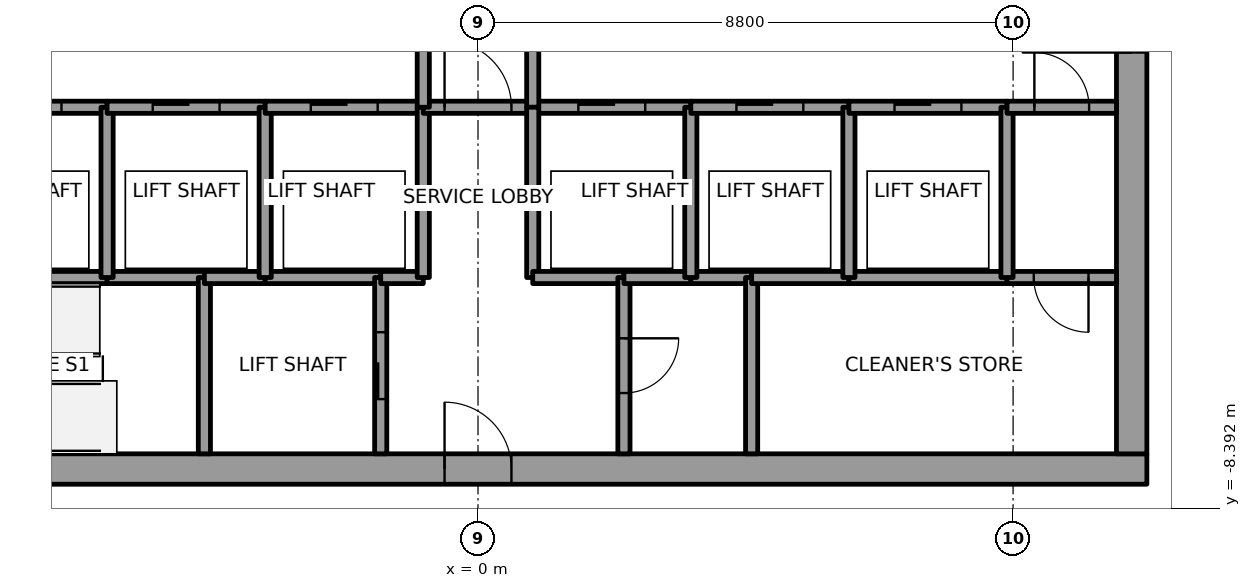
"""IFC4 building model, lengths in metres.
Left out: names, types, materials, properties, quantities, classifications, styles, units other than length and angle.
Written with IfcOpenShell. Run it as: python <this file> out.ifc"""

import sys

from ifc_helpers import new_model, si_unit, direction, frame, frame_2d, origin, place, context, subcontext, project, spatial, rectangle, extrude, element, fill, save


model = new_model("IFC4")
c1 = context("Model", 3, precision=1e-05, world=origin(), true_north=direction((0.0, 1.0)))
c2 = subcontext(c1, "Body", "Model", "MODEL_VIEW")
j1 = project(units=[si_unit("LENGTHUNIT", "METRE"), si_unit("PLANEANGLEUNIT", "RADIAN")], contexts=[c1])
p1 = place(None, origin())
s1 = spatial("IfcSite", under=j1, at=p1, CompositionType="ELEMENT")
p2 = place(p1, origin())
s2 = spatial("IfcBuilding", under=s1, at=p2, CompositionType="ELEMENT")
p3 = place(p2, frame((0.0, 0.0, 247.0)))
s3 = spatial("IfcBuildingStorey", under=s2, at=p3, CompositionType="ELEMENT", Elevation=247.0)
p4 = place(p3, frame((-11.0, -7.75, 0.0), z_axis=(0.0, 0.0, 1.0), x_axis=(1.0, 0.0, 0.0)))
e1 = element("IfcWall", 1, at=p4, inside=s3, PredefinedType="SHEAR", context=c2, shape_type="SweptSolid", body=[
    extrude(rectangle(XDim=22.0, YDim=0.5, at=frame_2d((11.0, 0.0))), origin(), (0.0, 0.0, 1.0), 4.0),
])
p5 = place(p4, frame((10.45, 0.0, 0.0)))
e2 = element("IfcOpeningElement", 2, at=p5, cuts=e1, PredefinedType="OPENING", context=c2, shape_type="SweptSolid", body=[
    extrude(rectangle(XDim=1.1, YDim=2.1, at=frame_2d((0.55, 1.05))), frame((0.0, 0.25, 0.0), z_axis=(0.0, -1.0, 0.0), x_axis=(1.0, 0.0, 0.0)), (0.0, 0.0, 1.0), 0.5),
])
p6 = place(p3, frame((10.75, -7.5, 0.0), z_axis=(0.0, 0.0, 1.0), x_axis=(0.0, 1.0, 0.0)))
e3 = element("IfcWall", 3, at=p6, inside=s3, PredefinedType="SHEAR", context=c2, shape_type="SweptSolid", body=[
    extrude(rectangle(XDim=15.0, YDim=0.5, at=frame_2d((7.5, 0.0))), origin(), (0.0, 0.0, 1.0), 4.0),
])
p7 = place(p6, frame((6.6, 0.0, 0.0)))
e4 = element("IfcOpeningElement", 4, at=p7, cuts=e3, PredefinedType="OPENING", context=c2, shape_type="SweptSolid", body=[
    extrude(rectangle(XDim=1.8, YDim=2.1, at=frame_2d((0.9, 1.05))), frame((0.0, 0.25, 0.0), z_axis=(0.0, -1.0, 0.0), x_axis=(1.0, 0.0, 0.0)), (0.0, 0.0, 1.0), 0.5),
])
p8 = place(p3, frame((-8.7, -4.6, 0.0), z_axis=(0.0, 0.0, 1.0), x_axis=(1.0, 0.0, 0.0)))
e5 = element("IfcWall", 5, at=p8, inside=s3, PredefinedType="SOLIDWALL", context=c2, shape_type="SweptSolid", body=[
    extrude(rectangle(XDim=2.6, YDim=0.2, at=frame_2d((1.3, 0.0))), origin(), (0.0, 0.0, 1.0), 3.85),
])
p9 = place(p3, frame((-8.7, -1.8, 0.0), z_axis=(0.0, 0.0, 1.0), x_axis=(1.0, 0.0, 0.0)))
e6 = element("IfcWall", 6, at=p9, inside=s3, PredefinedType="SOLIDWALL", context=c2, shape_type="SweptSolid", body=[
    extrude(rectangle(XDim=2.6, YDim=0.2, at=frame_2d((1.3, 0.0))), origin(), (0.0, 0.0, 1.0), 3.85),
])
p10 = place(p9, frame((0.75, 0.0, 0.0)))
e7 = element("IfcOpeningElement", 7, at=p10, cuts=e6, PredefinedType="OPENING", context=c2, shape_type="SweptSolid", body=[
    extrude(rectangle(XDim=1.1, YDim=2.1, at=frame_2d((0.55, 1.05))), frame((0.0, 0.1, 0.0), z_axis=(0.0, -1.0, 0.0), x_axis=(1.0, 0.0, 0.0)), (0.0, 0.0, 1.0), 0.2),
])
p11 = place(p3, frame((-6.1, -4.6, 0.0), z_axis=(0.0, 0.0, 1.0), x_axis=(1.0, 0.0, 0.0)))
e8 = element("IfcWall", 8, at=p11, inside=s3, PredefinedType="SOLIDWALL", context=c2, shape_type="SweptSolid", body=[
    extrude(rectangle(XDim=1.6, YDim=0.2, at=frame_2d((0.8, 0.0))), origin(), (0.0, 0.0, 1.0), 3.85),
])
p12 = place(p3, frame((-6.1, -4.6, 0.0), z_axis=(0.0, 0.0, 1.0), x_axis=(0.0, 1.0, 0.0)))
e9 = element("IfcWall", 9, at=p12, inside=s3, PredefinedType="SOLIDWALL", context=c2, shape_type="SweptSolid", body=[
    extrude(rectangle(XDim=2.8, YDim=0.2, at=frame_2d((1.4, 0.0))), origin(), (0.0, 0.0, 1.0), 3.85),
])
p13 = place(p3, frame((-6.1, -1.8, 0.0), z_axis=(0.0, 0.0, 1.0), x_axis=(1.0, 0.0, 0.0)))
e10 = element("IfcWall", 10, at=p13, inside=s3, PredefinedType="SOLIDWALL", context=c2, shape_type="SweptSolid", body=[
    extrude(rectangle(XDim=2.6, YDim=0.2, at=frame_2d((1.3, 0.0))), origin(), (0.0, 0.0, 1.0), 3.85),
])
p14 = place(p13, frame((0.75, 0.0, 0.0)))
e11 = element("IfcOpeningElement", 11, at=p14, cuts=e10, PredefinedType="OPENING", context=c2, shape_type="SweptSolid", body=[
    extrude(rectangle(XDim=1.1, YDim=2.1, at=frame_2d((0.55, 1.05))), frame((0.0, 0.1, 0.0), z_axis=(0.0, -1.0, 0.0), x_axis=(1.0, 0.0, 0.0)), (0.0, 0.0, 1.0), 0.2),
])
p15 = place(p3, frame((-4.5, -4.6, 0.0), z_axis=(0.0, 0.0, 1.0), x_axis=(0.0, -1.0, 0.0)))
e12 = element("IfcWall", 12, at=p15, inside=s3, PredefinedType="SOLIDWALL", context=c2, shape_type="SweptSolid", body=[
    extrude(rectangle(XDim=2.9, YDim=0.2, at=frame_2d((1.45, 0.0))), origin(), (0.0, 0.0, 1.0), 3.85),
])
p16 = place(p3, frame((-4.5, -4.6, 0.0), z_axis=(0.0, 0.0, 1.0), x_axis=(1.0, 0.0, 0.0)))
e13 = element("IfcWall", 13, at=p16, inside=s3, PredefinedType="SOLIDWALL", context=c2, shape_type="SweptSolid", body=[
    extrude(rectangle(XDim=1.0, YDim=0.2, at=frame_2d((0.5, 0.0))), origin(), (0.0, 0.0, 1.0), 3.85),
])
p17 = place(p3, frame((-3.5, -4.6, 0.0), z_axis=(0.0, 0.0, 1.0), x_axis=(1.0, 0.0, 0.0)))
e14 = element("IfcWall", 14, at=p17, inside=s3, PredefinedType="SOLIDWALL", context=c2, shape_type="SweptSolid", body=[
    extrude(rectangle(XDim=1.9, YDim=0.2, at=frame_2d((0.95, 0.0))), origin(), (0.0, 0.0, 1.0), 3.85),
])
p18 = place(p3, frame((-3.5, -4.6, 0.0), z_axis=(0.0, 0.0, 1.0), x_axis=(0.0, 1.0, 0.0)))
e15 = element("IfcWall", 15, at=p18, inside=s3, PredefinedType="SOLIDWALL", context=c2, shape_type="SweptSolid", body=[
    extrude(rectangle(XDim=2.8, YDim=0.2, at=frame_2d((1.4, 0.0))), origin(), (0.0, 0.0, 1.0), 3.85),
])
p19 = place(p3, frame((-3.5, -1.8, 0.0), z_axis=(0.0, 0.0, 1.0), x_axis=(1.0, 0.0, 0.0)))
e16 = element("IfcWall", 16, at=p19, inside=s3, PredefinedType="SOLIDWALL", context=c2, shape_type="SweptSolid", body=[
    extrude(rectangle(XDim=2.6, YDim=0.2, at=frame_2d((1.3, 0.0))), origin(), (0.0, 0.0, 1.0), 3.85),
])
p20 = place(p19, frame((0.75, 0.0, 0.0)))
e17 = element("IfcOpeningElement", 17, at=p20, cuts=e16, PredefinedType="OPENING", context=c2, shape_type="SweptSolid", body=[
    extrude(rectangle(XDim=1.1, YDim=2.1, at=frame_2d((0.55, 1.05))), frame((0.0, 0.1, 0.0), z_axis=(0.0, -1.0, 0.0), x_axis=(1.0, 0.0, 0.0)), (0.0, 0.0, 1.0), 0.2),
])
p21 = place(p3, frame((-1.6, -7.5, 0.0), z_axis=(0.0, 0.0, 1.0), x_axis=(0.0, 1.0, 0.0)))
e18 = element("IfcWall", 18, at=p21, inside=s3, PredefinedType="SOLIDWALL", context=c2, shape_type="SweptSolid", body=[
    extrude(rectangle(XDim=2.9, YDim=0.2, at=frame_2d((1.45, 0.0))), origin(), (0.0, 0.0, 1.0), 3.85),
])
p22 = place(p21, frame((0.9, 0.0, 0.0)))
e19 = element("IfcOpeningElement", 19, at=p22, cuts=e18, PredefinedType="OPENING", context=c2, shape_type="SweptSolid", body=[
    extrude(rectangle(XDim=1.1, YDim=2.1, at=frame_2d((0.55, 1.05))), frame((0.0, 0.1, 0.0), z_axis=(0.0, -1.0, 0.0), x_axis=(1.0, 0.0, 0.0)), (0.0, 0.0, 1.0), 0.2),
])
p23 = place(p3, frame((-1.6, -4.6, 0.0), z_axis=(0.0, 0.0, 1.0), x_axis=(1.0, 0.0, 0.0)))
e20 = element("IfcWall", 20, at=p23, inside=s3, PredefinedType="SOLIDWALL", context=c2, shape_type="SweptSolid", body=[
    extrude(rectangle(XDim=0.7, YDim=0.2, at=frame_2d((0.35, 0.0))), origin(), (0.0, 0.0, 1.0), 3.85),
])
p24 = place(p3, frame((-0.9, -4.6, 0.0), z_axis=(0.0, 0.0, 1.0), x_axis=(0.0, 1.0, 0.0)))
e21 = element("IfcWall", 21, at=p24, inside=s3, PredefinedType="SOLIDWALL", context=c2, shape_type="SweptSolid", body=[
    extrude(rectangle(XDim=2.8, YDim=0.2, at=frame_2d((1.4, 0.0))), origin(), (0.0, 0.0, 1.0), 3.85),
])
p25 = place(p3, frame((-0.9, -1.8, 0.0), z_axis=(0.0, 0.0, 1.0), x_axis=(1.0, 0.0, 0.0)))
e22 = element("IfcWall", 22, at=p25, inside=s3, PredefinedType="SOLIDWALL", context=c2, shape_type="SweptSolid", body=[
    extrude(rectangle(XDim=1.8, YDim=0.2, at=frame_2d((0.9, 0.0))), origin(), (0.0, 0.0, 1.0), 3.85),
])
p26 = place(p25, frame((0.35, 0.0, 0.0)))
e23 = element("IfcOpeningElement", 23, at=p26, cuts=e22, PredefinedType="OPENING", context=c2, shape_type="SweptSolid", body=[
    extrude(rectangle(XDim=1.1, YDim=2.1, at=frame_2d((0.55, 1.05))), frame((0.0, 0.1, 0.0), z_axis=(0.0, -1.0, 0.0), x_axis=(1.0, 0.0, 0.0)), (0.0, 0.0, 1.0), 0.2),
])
p27 = place(p3, frame((-0.9, 1.8, 0.0), z_axis=(0.0, 0.0, 1.0), x_axis=(0.0, -1.0, 0.0)))
e24 = element("IfcWall", 24, at=p27, inside=s3, PredefinedType="SOLIDWALL", context=c2, shape_type="SweptSolid", body=[
    extrude(rectangle(XDim=3.6, YDim=0.2, at=frame_2d((1.8, 0.0))), origin(), (0.0, 0.0, 1.0), 3.85),
])
p28 = place(p27, frame((1.05, 0.0, 0.0)))
e25 = element("IfcOpeningElement", 25, at=p28, cuts=e24, PredefinedType="OPENING", context=c2, shape_type="SweptSolid", body=[
    extrude(rectangle(XDim=1.5, YDim=2.1, at=frame_2d((0.75, 1.05))), frame((0.0, 0.1, 0.0), z_axis=(0.0, -1.0, 0.0), x_axis=(1.0, 0.0, 0.0)), (0.0, 0.0, 1.0), 0.2),
])
p29 = place(p3, frame((0.9, -1.8, 0.0), z_axis=(0.0, 0.0, 1.0), x_axis=(1.0, 0.0, 0.0)))
e26 = element("IfcWall", 26, at=p29, inside=s3, PredefinedType="SOLIDWALL", context=c2, shape_type="SweptSolid", body=[
    extrude(rectangle(XDim=2.6, YDim=0.2, at=frame_2d((1.3, 0.0))), origin(), (0.0, 0.0, 1.0), 3.85),
])
p30 = place(p29, frame((0.75, 0.0, 0.0)))
e27 = element("IfcOpeningElement", 27, at=p30, cuts=e26, PredefinedType="OPENING", context=c2, shape_type="SweptSolid", body=[
    extrude(rectangle(XDim=1.1, YDim=2.1, at=frame_2d((0.55, 1.05))), frame((0.0, 0.1, 0.0), z_axis=(0.0, -1.0, 0.0), x_axis=(1.0, 0.0, 0.0)), (0.0, 0.0, 1.0), 0.2),
])
p31 = place(p3, frame((0.9, -1.8, 0.0), z_axis=(0.0, 0.0, 1.0), x_axis=(0.0, 1.0, 0.0)))
e28 = element("IfcWall", 28, at=p31, inside=s3, PredefinedType="SOLIDWALL", context=c2, shape_type="SweptSolid", body=[
    extrude(rectangle(XDim=3.6, YDim=0.2, at=frame_2d((1.8, 0.0))), origin(), (0.0, 0.0, 1.0), 3.85),
])
p32 = place(p31, frame((1.05, 0.0, 0.0)))
e29 = element("IfcOpeningElement", 29, at=p32, cuts=e28, PredefinedType="OPENING", context=c2, shape_type="SweptSolid", body=[
    extrude(rectangle(XDim=1.5, YDim=2.1, at=frame_2d((0.75, 1.05))), frame((0.0, 0.1, 0.0), z_axis=(0.0, -1.0, 0.0), x_axis=(1.0, 0.0, 0.0)), (0.0, 0.0, 1.0), 0.2),
])
p33 = place(p3, frame((0.9, -1.8, 0.0), z_axis=(0.0, 0.0, 1.0), x_axis=(0.0, -1.0, 0.0)))
e30 = element("IfcWall", 30, at=p33, inside=s3, PredefinedType="SOLIDWALL", context=c2, shape_type="SweptSolid", body=[
    extrude(rectangle(XDim=2.8, YDim=0.2, at=frame_2d((1.4, 0.0))), origin(), (0.0, 0.0, 1.0), 3.85),
])
p34 = place(p3, frame((0.9, -4.6, 0.0), z_axis=(0.0, 0.0, 1.0), x_axis=(1.0, 0.0, 0.0)))
e31 = element("IfcWall", 31, at=p34, inside=s3, PredefinedType="SOLIDWALL", context=c2, shape_type="SweptSolid", body=[
    extrude(rectangle(XDim=1.5, YDim=0.2, at=frame_2d((0.75, 0.0))), origin(), (0.0, 0.0, 1.0), 3.85),
])
p35 = place(p3, frame((2.4, -4.6, 0.0), z_axis=(0.0, 0.0, 1.0), x_axis=(0.0, -1.0, 0.0)))
e32 = element("IfcWall", 32, at=p35, inside=s3, PredefinedType="SOLIDWALL", context=c2, shape_type="SweptSolid", body=[
    extrude(rectangle(XDim=2.9, YDim=0.2, at=frame_2d((1.45, 0.0))), origin(), (0.0, 0.0, 1.0), 3.85),
])
p36 = place(p35, frame((1.0, 0.0, 0.0)))
e33 = element("IfcOpeningElement", 33, at=p36, cuts=e32, PredefinedType="OPENING", context=c2, shape_type="SweptSolid", body=[
    extrude(rectangle(XDim=0.9, YDim=2.1, at=frame_2d((0.45, 1.05))), frame((0.0, 0.1, 0.0), z_axis=(0.0, -1.0, 0.0), x_axis=(1.0, 0.0, 0.0)), (0.0, 0.0, 1.0), 0.2),
])
p37 = place(p3, frame((3.5, -4.6, 0.0), z_axis=(0.0, 0.0, 1.0), x_axis=(-1.0, 0.0, 0.0)))
e34 = element("IfcWall", 34, at=p37, inside=s3, PredefinedType="SOLIDWALL", context=c2, shape_type="SweptSolid", body=[
    extrude(rectangle(XDim=1.1, YDim=0.2, at=frame_2d((0.55, 0.0))), origin(), (0.0, 0.0, 1.0), 3.85),
])
p38 = place(p3, frame((4.5, -4.6, 0.0), z_axis=(0.0, 0.0, 1.0), x_axis=(-1.0, 0.0, 0.0)))
e35 = element("IfcWall", 35, at=p38, inside=s3, PredefinedType="SOLIDWALL", context=c2, shape_type="SweptSolid", body=[
    extrude(rectangle(XDim=1.0, YDim=0.2, at=frame_2d((0.5, 0.0))), origin(), (0.0, 0.0, 1.0), 3.85),
])
p39 = place(p3, frame((3.5, -4.6, 0.0), z_axis=(0.0, 0.0, 1.0), x_axis=(0.0, 1.0, 0.0)))
e36 = element("IfcWall", 36, at=p39, inside=s3, PredefinedType="SOLIDWALL", context=c2, shape_type="SweptSolid", body=[
    extrude(rectangle(XDim=2.8, YDim=0.2, at=frame_2d((1.4, 0.0))), origin(), (0.0, 0.0, 1.0), 3.85),
])
p40 = place(p3, frame((3.5, -1.8, 0.0), z_axis=(0.0, 0.0, 1.0), x_axis=(1.0, 0.0, 0.0)))
e37 = element("IfcWall", 37, at=p40, inside=s3, PredefinedType="SOLIDWALL", context=c2, shape_type="SweptSolid", body=[
    extrude(rectangle(XDim=2.6, YDim=0.2, at=frame_2d((1.3, 0.0))), origin(), (0.0, 0.0, 1.0), 3.85),
])
p41 = place(p40, frame((0.75, 0.0, 0.0)))
e38 = element("IfcOpeningElement", 38, at=p41, cuts=e37, PredefinedType="OPENING", context=c2, shape_type="SweptSolid", body=[
    extrude(rectangle(XDim=1.1, YDim=2.1, at=frame_2d((0.55, 1.05))), frame((0.0, 0.1, 0.0), z_axis=(0.0, -1.0, 0.0), x_axis=(1.0, 0.0, 0.0)), (0.0, 0.0, 1.0), 0.2),
])
p42 = place(p3, frame((4.5, -4.6, 0.0), z_axis=(0.0, 0.0, 1.0), x_axis=(0.0, -1.0, 0.0)))
e39 = element("IfcWall", 39, at=p42, inside=s3, PredefinedType="SOLIDWALL", context=c2, shape_type="SweptSolid", body=[
    extrude(rectangle(XDim=2.9, YDim=0.2, at=frame_2d((1.45, 0.0))), origin(), (0.0, 0.0, 1.0), 3.85),
])
p43 = place(p3, frame((6.1, -4.6, 0.0), z_axis=(0.0, 0.0, 1.0), x_axis=(-1.0, 0.0, 0.0)))
e40 = element("IfcWall", 40, at=p43, inside=s3, PredefinedType="SOLIDWALL", context=c2, shape_type="SweptSolid", body=[
    extrude(rectangle(XDim=1.6, YDim=0.2, at=frame_2d((0.8, 0.0))), origin(), (0.0, 0.0, 1.0), 3.85),
])
p44 = place(p3, frame((8.7, -4.6, 0.0), z_axis=(0.0, 0.0, 1.0), x_axis=(-1.0, 0.0, 0.0)))
e41 = element("IfcWall", 41, at=p44, inside=s3, PredefinedType="SOLIDWALL", context=c2, shape_type="SweptSolid", body=[
    extrude(rectangle(XDim=2.6, YDim=0.2, at=frame_2d((1.3, 0.0))), origin(), (0.0, 0.0, 1.0), 3.85),
])
p45 = place(p3, frame((6.1, -4.6, 0.0), z_axis=(0.0, 0.0, 1.0), x_axis=(0.0, 1.0, 0.0)))
e42 = element("IfcWall", 42, at=p45, inside=s3, PredefinedType="SOLIDWALL", context=c2, shape_type="SweptSolid", body=[
    extrude(rectangle(XDim=2.8, YDim=0.2, at=frame_2d((1.4, 0.0))), origin(), (0.0, 0.0, 1.0), 3.85),
])
p46 = place(p3, frame((6.1, -1.8, 0.0), z_axis=(0.0, 0.0, 1.0), x_axis=(1.0, 0.0, 0.0)))
e43 = element("IfcWall", 43, at=p46, inside=s3, PredefinedType="SOLIDWALL", context=c2, shape_type="SweptSolid", body=[
    extrude(rectangle(XDim=2.6, YDim=0.2, at=frame_2d((1.3, 0.0))), origin(), (0.0, 0.0, 1.0), 3.85),
])
p47 = place(p46, frame((0.75, 0.0, 0.0)))
e44 = element("IfcOpeningElement", 44, at=p47, cuts=e43, PredefinedType="OPENING", context=c2, shape_type="SweptSolid", body=[
    extrude(rectangle(XDim=1.1, YDim=2.1, at=frame_2d((0.55, 1.05))), frame((0.0, 0.1, 0.0), z_axis=(0.0, -1.0, 0.0), x_axis=(1.0, 0.0, 0.0)), (0.0, 0.0, 1.0), 0.2),
])
p48 = place(p3, frame((10.5, -4.6, 0.0), z_axis=(0.0, 0.0, 1.0), x_axis=(-1.0, 0.0, 0.0)))
e45 = element("IfcWall", 45, at=p48, inside=s3, PredefinedType="SOLIDWALL", context=c2, shape_type="SweptSolid", body=[
    extrude(rectangle(XDim=1.8, YDim=0.2, at=frame_2d((0.9, 0.0))), origin(), (0.0, 0.0, 1.0), 3.85),
])
p49 = place(p48, frame((0.46, 0.0, 0.0)))
e46 = element("IfcOpeningElement", 46, at=p49, cuts=e45, PredefinedType="OPENING", context=c2, shape_type="SweptSolid", body=[
    extrude(rectangle(XDim=0.9, YDim=2.1, at=frame_2d((0.45, 1.05))), frame((0.0, 0.1, 0.0), z_axis=(0.0, -1.0, 0.0), x_axis=(1.0, 0.0, 0.0)), (0.0, 0.0, 1.0), 0.2),
])
p50 = place(p3, frame((8.7, -1.8, 0.0), z_axis=(0.0, 0.0, 1.0), x_axis=(0.0, -1.0, 0.0)))
e47 = element("IfcWall", 47, at=p50, inside=s3, PredefinedType="SOLIDWALL", context=c2, shape_type="SweptSolid", body=[
    extrude(rectangle(XDim=2.8, YDim=0.2, at=frame_2d((1.4, 0.0))), origin(), (0.0, 0.0, 1.0), 3.85),
])
p51 = place(p3, frame((8.7, -1.8, 0.0), z_axis=(0.0, 0.0, 1.0), x_axis=(1.0, 0.0, 0.0)))
e48 = element("IfcWall", 48, at=p51, inside=s3, PredefinedType="SOLIDWALL", context=c2, shape_type="SweptSolid", body=[
    extrude(rectangle(XDim=1.8, YDim=0.2, at=frame_2d((0.9, 0.0))), origin(), (0.0, 0.0, 1.0), 3.85),
])
p52 = place(p51, frame((0.45, 0.0, 0.0)))
e49 = element("IfcOpeningElement", 49, at=p52, cuts=e48, PredefinedType="OPENING", context=c2, shape_type="SweptSolid", body=[
    extrude(rectangle(XDim=0.9, YDim=2.1, at=frame_2d((0.45, 1.05))), frame((0.0, 0.1, 0.0), z_axis=(0.0, -1.0, 0.0), x_axis=(1.0, 0.0, 0.0)), (0.0, 0.0, 1.0), 0.2),
])
p53 = place(p10, origin())
e50 = element("IfcDoor", 50, at=p53, inside=s3, OperationType="SLIDING_TO_RIGHT", PredefinedType="DOOR", context=c2, shape_type="SweptSolid", body=[
    extrude(rectangle(XDim=1.1, YDim=2.1, at=frame_2d((0.55, 1.05))), frame((0.0, 0.025, 0.0), z_axis=(0.0, -1.0, 0.0), x_axis=(1.0, 0.0, 0.0)), (0.0, 0.0, 1.0), 0.05),
])
fill(e7, e50)
p54 = place(p14, origin())
e51 = element("IfcDoor", 51, at=p54, inside=s3, OperationType="SLIDING_TO_LEFT", PredefinedType="DOOR", context=c2, shape_type="SweptSolid", body=[
    extrude(rectangle(XDim=1.1, YDim=2.1, at=frame_2d((0.55, 1.05))), frame((0.0, 0.025, 0.0), z_axis=(0.0, -1.0, 0.0), x_axis=(1.0, 0.0, 0.0)), (0.0, 0.0, 1.0), 0.05),
])
fill(e11, e51)
p55 = place(p20, origin())
e52 = element("IfcDoor", 52, at=p55, inside=s3, OperationType="SLIDING_TO_LEFT", PredefinedType="DOOR", context=c2, shape_type="SweptSolid", body=[
    extrude(rectangle(XDim=1.1, YDim=2.1, at=frame_2d((0.55, 1.05))), frame((0.0, 0.025, 0.0), z_axis=(0.0, -1.0, 0.0), x_axis=(1.0, 0.0, 0.0)), (0.0, 0.0, 1.0), 0.05),
])
fill(e17, e52)
p56 = place(p30, origin())
e53 = element("IfcDoor", 53, at=p56, inside=s3, OperationType="SLIDING_TO_RIGHT", PredefinedType="DOOR", context=c2, shape_type="SweptSolid", body=[
    extrude(rectangle(XDim=1.1, YDim=2.1, at=frame_2d((0.55, 1.05))), frame((0.0, 0.025, 0.0), z_axis=(0.0, -1.0, 0.0), x_axis=(1.0, 0.0, 0.0)), (0.0, 0.0, 1.0), 0.05),
])
fill(e27, e53)
p57 = place(p41, origin())
e54 = element("IfcDoor", 54, at=p57, inside=s3, OperationType="SLIDING_TO_LEFT", PredefinedType="DOOR", context=c2, shape_type="SweptSolid", body=[
    extrude(rectangle(XDim=1.1, YDim=2.1, at=frame_2d((0.55, 1.05))), frame((0.0, 0.025, 0.0), z_axis=(0.0, -1.0, 0.0), x_axis=(1.0, 0.0, 0.0)), (0.0, 0.0, 1.0), 0.05),
])
fill(e38, e54)
p58 = place(p47, origin())
e55 = element("IfcDoor", 55, at=p58, inside=s3, OperationType="SLIDING_TO_LEFT", PredefinedType="DOOR", context=c2, shape_type="SweptSolid", body=[
    extrude(rectangle(XDim=1.1, YDim=2.1, at=frame_2d((0.55, 1.05))), frame((0.0, 0.025, 0.0), z_axis=(0.0, -1.0, 0.0), x_axis=(1.0, 0.0, 0.0)), (0.0, 0.0, 1.0), 0.05),
])
fill(e44, e55)
p59 = place(p22, origin())
e56 = element("IfcDoor", 56, at=p59, inside=s3, OperationType="SLIDING_TO_LEFT", PredefinedType="DOOR", context=c2, shape_type="SweptSolid", body=[
    extrude(rectangle(XDim=1.1, YDim=2.1, at=frame_2d((0.55, 1.05))), frame((0.0, 0.025, 0.0), z_axis=(0.0, -1.0, 0.0), x_axis=(1.0, 0.0, 0.0)), (0.0, 0.0, 1.0), 0.05),
])
fill(e19, e56)
p60 = place(p26, origin())
e57 = element("IfcDoor", 57, at=p60, inside=s3, OperationType="SINGLE_SWING_RIGHT", PredefinedType="DOOR", context=c2, shape_type="SweptSolid", body=[
    extrude(rectangle(XDim=1.1, YDim=2.1, at=frame_2d((0.55, 1.05))), frame((0.0, 0.025, 0.0), z_axis=(0.0, -1.0, 0.0), x_axis=(1.0, 0.0, 0.0)), (0.0, 0.0, 1.0), 0.05),
])
fill(e23, e57)
p61 = place(p49, origin())
e58 = element("IfcDoor", 58, at=p61, inside=s3, OperationType="SINGLE_SWING_LEFT", PredefinedType="DOOR", context=c2, shape_type="SweptSolid", body=[
    extrude(rectangle(XDim=0.9, YDim=2.1, at=frame_2d((0.45, 1.05))), frame((0.0, 0.025, 0.0), z_axis=(0.0, -1.0, 0.0), x_axis=(1.0, 0.0, 0.0)), (0.0, 0.0, 1.0), 0.05),
])
fill(e46, e58)
p62 = place(p52, origin())
e59 = element("IfcDoor", 59, at=p62, inside=s3, OperationType="SINGLE_SWING_LEFT", PredefinedType="DOOR", context=c2, shape_type="SweptSolid", body=[
    extrude(rectangle(XDim=0.9, YDim=2.1, at=frame_2d((0.45, 1.05))), frame((0.0, 0.025, 0.0), z_axis=(0.0, -1.0, 0.0), x_axis=(1.0, 0.0, 0.0)), (0.0, 0.0, 1.0), 0.05),
])
fill(e49, e59)
p63 = place(p36, origin())
e60 = element("IfcDoor", 60, at=p63, inside=s3, OperationType="SINGLE_SWING_LEFT", PredefinedType="DOOR", context=c2, shape_type="SweptSolid", body=[
    extrude(rectangle(XDim=0.9, YDim=2.1, at=frame_2d((0.45, 1.05))), frame((0.0, 0.025, 0.0), z_axis=(0.0, -1.0, 0.0), x_axis=(1.0, 0.0, 0.0)), (0.0, 0.0, 1.0), 0.05),
])
fill(e33, e60)
p64 = place(p7, origin())
e61 = element("IfcDoor", 61, at=p64, inside=s3, OperationType="DOUBLE_DOOR_SINGLE_SWING", PredefinedType="DOOR", context=c2, shape_type="SweptSolid", body=[
    extrude(rectangle(XDim=1.8, YDim=2.1, at=frame_2d((0.9, 1.05))), frame((0.0, 0.025, 0.0), z_axis=(0.0, -1.0, 0.0), x_axis=(1.0, 0.0, 0.0)), (0.0, 0.0, 1.0), 0.05),
])
fill(e4, e61)
p65 = place(p5, origin())
e62 = element("IfcDoor", 62, at=p65, inside=s3, OperationType="SINGLE_SWING_LEFT", PredefinedType="DOOR", context=c2, shape_type="SweptSolid", body=[
    extrude(rectangle(XDim=1.1, YDim=2.1, at=frame_2d((0.55, 1.05))), frame((0.0, 0.025, 0.0), z_axis=(0.0, -1.0, 0.0), x_axis=(1.0, 0.0, 0.0)), (0.0, 0.0, 1.0), 0.05),
])
fill(e2, e62)
save(model, sys.argv[1])
